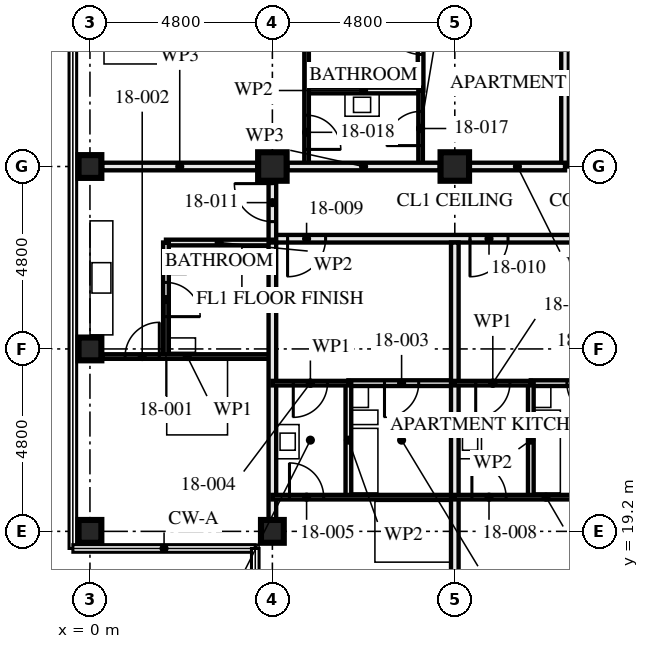
"""IFC4 building model, lengths in metres.
Left out: names, types, materials, properties, quantities, classifications, styles, units other than length and angle.
Written with IfcOpenShell. Run it as: python <this file> out.ifc"""

import sys

from ifc_helpers import new_model, si_unit, direction, frame, frame_2d, origin, origin_2d, place, context, subcontext, project, spatial, rectangle, hollow_rectangle, extrude, element, fill, save


model = new_model("IFC4")
c1 = context("Model", 3, precision=1e-05, world=origin(), true_north=direction((0.0, 1.0)))
c2 = subcontext(c1, "Body", "Model", "MODEL_VIEW")
j1 = project(units=[si_unit("LENGTHUNIT", "METRE"), si_unit("PLANEANGLEUNIT", "RADIAN")], contexts=[c1])
p1 = place(None, origin())
s1 = spatial("IfcSite", under=j1, at=p1, CompositionType="ELEMENT")
p2 = place(p1, origin())
s2 = spatial("IfcBuilding", under=s1, at=p2, CompositionType="ELEMENT")
p3 = place(p2, frame((0.0, 0.0, 69.0)))
s3 = spatial("IfcBuildingStorey", under=s2, at=p3, CompositionType="ELEMENT", Elevation=69.0)
for number, where, z_axis, x_axis in (
    (1, (0.0, 19.2, 0.0), (0.0, 0.0, 1.0), (0.0, 1.0, 0.0)),
    (2, (0.0, 24.0, 0.0), (0.0, 0.0, 1.0), (1.0, 0.0, 0.0)),
    (3, (0.0, 28.8, 0.0), (0.0, 0.0, 1.0), (0.0, 1.0, 0.0)),
    (4, (4.8, 19.2, 0.0), (0.0, 0.0, 1.0), (0.0, 1.0, 0.0)),
):
    element("IfcColumn", number, at=place(p3, frame(where, z_axis=z_axis, x_axis=x_axis)), inside=s3, PredefinedType="COLUMN", context=c2, shape_type="SweptSolid", body=[
        extrude(hollow_rectangle(XDim=0.6, YDim=0.6, WallThickness=0.08, at=origin_2d()), origin(), (0.0, 0.0, 1.0), 3.5),
    ])
for number, where, z_axis, x_axis in (
    (5, (4.8, 28.8, 0.0), (0.0, 0.0, 1.0), (0.0, 1.0, 0.0)),
    (6, (9.6, 28.8, 0.0), (0.0, 0.0, 1.0), (0.0, 1.0, 0.0)),
):
    element("IfcColumn", number, at=place(p3, frame(where, z_axis=z_axis, x_axis=x_axis)), inside=s3, PredefinedType="COLUMN", context=c2, shape_type="SweptSolid", body=[
        extrude(hollow_rectangle(XDim=0.75, YDim=0.75, WallThickness=0.08, at=origin_2d()), origin(), (0.0, 0.0, 1.0), 3.5),
    ])
p4 = place(p3, frame((2.0, 23.8, 0.0), z_axis=(0.0, 0.0, 1.0), x_axis=(0.0, 1.0, 0.0)))
e7 = element("IfcWall", 7, at=p4, inside=s3, PredefinedType="PARTITIONING", context=c2, shape_type="SweptSolid", body=[
    extrude(rectangle(XDim=3.0, YDim=0.15, at=frame_2d((1.5, 0.0))), origin(), (0.0, 0.0, 1.0), 2.55),
])
p5 = place(p4, frame((1.05, 0.0, 0.0)))
e8 = element("IfcOpeningElement", 8, at=p5, cuts=e7, PredefinedType="OPENING", context=c2, shape_type="SweptSolid", body=[
    extrude(rectangle(XDim=0.9, YDim=2.1, at=frame_2d((0.45, 1.05))), frame((0.0, 0.085, 0.0), z_axis=(0.0, -1.0, 0.0), x_axis=(1.0, 0.0, 0.0)), (0.0, 0.0, 1.0), 0.171),
])
p6 = place(p3, frame((2.0, 26.8, 0.0), z_axis=(0.0, 0.0, 1.0), x_axis=(1.0, 0.0, 0.0)))
e9 = element("IfcWall", 9, at=p6, inside=s3, PredefinedType="PARTITIONING", context=c2, shape_type="SweptSolid", body=[
    extrude(rectangle(XDim=2.8, YDim=0.15, at=frame_2d((1.4, 0.0))), origin(), (0.0, 0.0, 1.0), 3.33),
])
p7 = place(p3, frame((0.32, 23.8, 0.0), z_axis=(0.0, 0.0, 1.0), x_axis=(1.0, 0.0, 0.0)))
e10 = element("IfcWall", 10, at=p7, inside=s3, PredefinedType="PARTITIONING", context=c2, shape_type="SweptSolid", body=[
    extrude(rectangle(XDim=4.48, YDim=0.12, at=frame_2d((2.24, 0.0))), origin(), (0.0, 0.0, 1.0), 3.33),
])
p8 = place(p7, frame((0.605, 0.0, 0.0)))
e11 = element("IfcOpeningElement", 11, at=p8, cuts=e10, PredefinedType="OPENING", context=c2, shape_type="SweptSolid", body=[
    extrude(rectangle(XDim=0.9, YDim=2.1, at=frame_2d((0.45, 1.05))), frame((0.0, 0.071, 0.0), z_axis=(0.0, -1.0, 0.0), x_axis=(1.0, 0.0, 0.0)), (0.0, 0.0, 1.0), 0.141),
])
p9 = place(p3, frame((4.8, 19.52, 0.0), z_axis=(0.0, 0.0, 1.0), x_axis=(0.0, 1.0, 0.0)))
e12 = element("IfcWall", 12, at=p9, inside=s3, PredefinedType="PARTITIONING", context=c2, shape_type="SweptSolid", body=[
    extrude(rectangle(XDim=7.28, YDim=0.2, at=frame_2d((3.64, 0.0))), origin(), (0.0, 0.0, 1.0), 2.55),
])
p10 = place(p3, frame((6.8, 20.1, 0.0), z_axis=(0.0, 0.0, 1.0), x_axis=(0.0, 1.0, 0.0)))
e13 = element("IfcWall", 13, at=p10, inside=s3, PredefinedType="PARTITIONING", context=c2, shape_type="SweptSolid", body=[
    extrude(rectangle(XDim=3.0, YDim=0.15, at=frame_2d((1.5, 0.0))), origin(), (0.0, 0.0, 1.0), 3.33),
])
p11 = place(p3, frame((6.8, 23.1, 0.0), z_axis=(0.0, 0.0, 1.0), x_axis=(1.0, 0.0, 0.0)))
e14 = element("IfcWall", 14, at=p11, inside=s3, PredefinedType="PARTITIONING", context=c2, shape_type="SweptSolid", body=[
    extrude(rectangle(XDim=2.8, YDim=0.15, at=frame_2d((1.4, 0.0))), origin(), (0.0, 0.0, 1.0), 3.33),
])
p12 = place(p11, frame((0.95, 0.0, 0.0)))
e15 = element("IfcOpeningElement", 15, at=p12, cuts=e14, PredefinedType="OPENING", context=c2, shape_type="SweptSolid", body=[
    extrude(rectangle(XDim=0.9, YDim=2.1, at=frame_2d((0.45, 1.05))), frame((0.0, 0.085, 0.0), z_axis=(0.0, -1.0, 0.0), x_axis=(1.0, 0.0, 0.0)), (0.0, 0.0, 1.0), 0.171),
])
p13 = place(p3, frame((4.8, 23.1, 0.0), z_axis=(0.0, 0.0, 1.0), x_axis=(1.0, 0.0, 0.0)))
e16 = element("IfcWall", 16, at=p13, inside=s3, PredefinedType="PARTITIONING", context=c2, shape_type="SweptSolid", body=[
    extrude(rectangle(XDim=2.0, YDim=0.12, at=frame_2d((1.0, 0.0))), origin(), (0.0, 0.0, 1.0), 3.33),
])
p14 = place(p13, frame((0.55, 0.0, 0.0)))
e17 = element("IfcOpeningElement", 17, at=p14, cuts=e16, PredefinedType="OPENING", context=c2, shape_type="SweptSolid", body=[
    extrude(rectangle(XDim=0.9, YDim=2.1, at=frame_2d((0.45, 1.05))), frame((0.0, 0.071, 0.0), z_axis=(0.0, -1.0, 0.0), x_axis=(1.0, 0.0, 0.0)), (0.0, 0.0, 1.0), 0.141),
])
p15 = place(p3, frame((4.8, 20.1, 0.0), z_axis=(0.0, 0.0, 1.0), x_axis=(1.0, 0.0, 0.0)))
e18 = element("IfcWall", 18, at=p15, inside=s3, PredefinedType="PARTITIONING", context=c2, shape_type="SweptSolid", body=[
    extrude(rectangle(XDim=4.8, YDim=0.12, at=frame_2d((2.4, 0.0))), origin(), (0.0, 0.0, 1.0), 3.33),
])
p16 = place(p15, frame((0.45, 0.0, 0.0)))
e19 = element("IfcOpeningElement", 19, at=p16, cuts=e18, PredefinedType="OPENING", context=c2, shape_type="SweptSolid", body=[
    extrude(rectangle(XDim=0.9, YDim=2.1, at=frame_2d((0.45, 1.05))), frame((0.0, 0.071, 0.0), z_axis=(0.0, -1.0, 0.0), x_axis=(1.0, 0.0, 0.0)), (0.0, 0.0, 1.0), 0.141),
])
p17 = place(p3, frame((9.6, 14.72, 0.0), z_axis=(0.0, 0.0, 1.0), x_axis=(0.0, 1.0, 0.0)))
e20 = element("IfcWall", 20, at=p17, inside=s3, PredefinedType="PARTITIONING", context=c2, shape_type="SweptSolid", body=[
    extrude(rectangle(XDim=12.08, YDim=0.2, at=frame_2d((6.04, 0.0))), origin(), (0.0, 0.0, 1.0), 2.55),
])
p18 = place(p3, frame((11.6, 20.1, 0.0), z_axis=(0.0, 0.0, 1.0), x_axis=(0.0, 1.0, 0.0)))
e21 = element("IfcWall", 21, at=p18, inside=s3, PredefinedType="PARTITIONING", context=c2, shape_type="SweptSolid", body=[
    extrude(rectangle(XDim=3.0, YDim=0.15, at=frame_2d((1.5, 0.0))), origin(), (0.0, 0.0, 1.0), 3.33),
])
p19 = place(p3, frame((11.6, 23.1, 0.0), z_axis=(0.0, 0.0, 1.0), x_axis=(1.0, 0.0, 0.0)))
e22 = element("IfcWall", 22, at=p19, inside=s3, PredefinedType="PARTITIONING", context=c2, shape_type="SweptSolid", body=[
    extrude(rectangle(XDim=2.8, YDim=0.15, at=frame_2d((1.4, 0.0))), origin(), (0.0, 0.0, 1.0), 3.33),
])
p20 = place(p19, frame((0.95, 0.0, 0.0)))
e23 = element("IfcOpeningElement", 23, at=p20, cuts=e22, PredefinedType="OPENING", context=c2, shape_type="SweptSolid", body=[
    extrude(rectangle(XDim=0.9, YDim=2.1, at=frame_2d((0.45, 1.05))), frame((0.0, 0.085, 0.0), z_axis=(0.0, -1.0, 0.0), x_axis=(1.0, 0.0, 0.0)), (0.0, 0.0, 1.0), 0.171),
])
p21 = place(p3, frame((9.6, 23.1, 0.0), z_axis=(0.0, 0.0, 1.0), x_axis=(1.0, 0.0, 0.0)))
e24 = element("IfcWall", 24, at=p21, inside=s3, PredefinedType="PARTITIONING", context=c2, shape_type="SweptSolid", body=[
    extrude(rectangle(XDim=2.0, YDim=0.12, at=frame_2d((1.0, 0.0))), origin(), (0.0, 0.0, 1.0), 3.33),
])
p22 = place(p21, frame((0.55, 0.0, 0.0)))
e25 = element("IfcOpeningElement", 25, at=p22, cuts=e24, PredefinedType="OPENING", context=c2, shape_type="SweptSolid", body=[
    extrude(rectangle(XDim=0.9, YDim=2.1, at=frame_2d((0.45, 1.05))), frame((0.0, 0.071, 0.0), z_axis=(0.0, -1.0, 0.0), x_axis=(1.0, 0.0, 0.0)), (0.0, 0.0, 1.0), 0.141),
])
p23 = place(p3, frame((9.6, 20.1, 0.0), z_axis=(0.0, 0.0, 1.0), x_axis=(1.0, 0.0, 0.0)))
e26 = element("IfcWall", 26, at=p23, inside=s3, PredefinedType="PARTITIONING", context=c2, shape_type="SweptSolid", body=[
    extrude(rectangle(XDim=4.8, YDim=0.12, at=frame_2d((2.4, 0.0))), origin(), (0.0, 0.0, 1.0), 3.33),
])
p24 = place(p23, frame((0.45, 0.0, 0.0)))
e27 = element("IfcOpeningElement", 27, at=p24, cuts=e26, PredefinedType="OPENING", context=c2, shape_type="SweptSolid", body=[
    extrude(rectangle(XDim=0.9, YDim=2.1, at=frame_2d((0.45, 1.05))), frame((0.0, 0.071, 0.0), z_axis=(0.0, -1.0, 0.0), x_axis=(1.0, 0.0, 0.0)), (0.0, 0.0, 1.0), 0.141),
])
p25 = place(p3, frame((4.8, 26.9, 0.0), z_axis=(0.0, 0.0, 1.0), x_axis=(1.0, 0.0, 0.0)))
e28 = element("IfcWall", 28, at=p25, inside=s3, PredefinedType="PARTITIONING", context=c2, shape_type="SweptSolid", body=[
    extrude(rectangle(XDim=9.6, YDim=0.2, at=frame_2d((4.8, 0.0))), origin(), (0.0, 0.0, 1.0), 3.33),
])
p26 = place(p25, frame((0.4, 0.0, 0.0)))
e29 = element("IfcOpeningElement", 29, at=p26, cuts=e28, PredefinedType="OPENING", context=c2, shape_type="SweptSolid", body=[
    extrude(rectangle(XDim=1.0, YDim=2.1, at=frame_2d((0.5, 1.05))), frame((0.0, 0.111, 0.0), z_axis=(0.0, -1.0, 0.0), x_axis=(1.0, 0.0, 0.0)), (0.0, 0.0, 1.0), 0.221),
])
p27 = place(p25, frame((5.2, 0.0, 0.0)))
e30 = element("IfcOpeningElement", 30, at=p27, cuts=e28, PredefinedType="OPENING", context=c2, shape_type="SweptSolid", body=[
    extrude(rectangle(XDim=1.0, YDim=2.1, at=frame_2d((0.5, 1.05))), frame((0.0, 0.111, 0.0), z_axis=(0.0, -1.0, 0.0), x_axis=(1.0, 0.0, 0.0)), (0.0, 0.0, 1.0), 0.221),
])
p28 = place(p3, frame((4.8, 26.8, 0.0), z_axis=(0.0, 0.0, 1.0), x_axis=(0.0, 1.0, 0.0)))
e31 = element("IfcWall", 31, at=p28, inside=s3, PredefinedType="PARTITIONING", context=c2, shape_type="SweptSolid", body=[
    extrude(rectangle(XDim=1.605, YDim=0.2, at=frame_2d((0.802, 0.0))), origin(), (0.0, 0.0, 1.0), 3.33),
])
p29 = place(p28, frame((0.55, 0.0, 0.0)))
e32 = element("IfcOpeningElement", 32, at=p29, cuts=e31, PredefinedType="OPENING", context=c2, shape_type="SweptSolid", body=[
    extrude(rectangle(XDim=1.0, YDim=2.1, at=frame_2d((0.5, 1.05))), frame((0.0, 0.111, 0.0), z_axis=(0.0, -1.0, 0.0), x_axis=(1.0, 0.0, 0.0)), (0.0, 0.0, 1.0), 0.221),
])
p30 = place(p3, frame((5.7, 30.8, 0.0), z_axis=(0.0, 0.0, 1.0), x_axis=(1.0, 0.0, 0.0)))
e33 = element("IfcWall", 33, at=p30, inside=s3, PredefinedType="PARTITIONING", context=c2, shape_type="SweptSolid", body=[
    extrude(rectangle(XDim=3.0, YDim=0.15, at=frame_2d((1.5, 0.0))), origin(), (0.0, 0.0, 1.0), 3.33),
])
p31 = place(p3, frame((8.7, 33.6, 0.0), z_axis=(0.0, 0.0, 1.0), x_axis=(0.0, -1.0, 0.0)))
e34 = element("IfcWall", 34, at=p31, inside=s3, PredefinedType="PARTITIONING", context=c2, shape_type="SweptSolid", body=[
    extrude(rectangle(XDim=2.8, YDim=0.15, at=frame_2d((1.4, 0.0))), origin(), (0.0, 0.0, 1.0), 3.33),
])
p32 = place(p31, frame((0.95, 0.0, 0.0)))
e35 = element("IfcOpeningElement", 35, at=p32, cuts=e34, PredefinedType="OPENING", context=c2, shape_type="SweptSolid", body=[
    extrude(rectangle(XDim=0.9, YDim=2.1, at=frame_2d((0.45, 1.05))), frame((0.0, 0.085, 0.0), z_axis=(0.0, -1.0, 0.0), x_axis=(1.0, 0.0, 0.0)), (0.0, 0.0, 1.0), 0.171),
])
p33 = place(p3, frame((8.7, 30.8, 0.0), z_axis=(0.0, 0.0, 1.0), x_axis=(0.0, -1.0, 0.0)))
e36 = element("IfcWall", 36, at=p33, inside=s3, PredefinedType="PARTITIONING", context=c2, shape_type="SweptSolid", body=[
    extrude(rectangle(XDim=2.0, YDim=0.12, at=frame_2d((1.0, 0.0))), origin(), (0.0, 0.0, 1.0), 3.33),
])
p34 = place(p33, frame((0.55, 0.0, 0.0)))
e37 = element("IfcOpeningElement", 37, at=p34, cuts=e36, PredefinedType="OPENING", context=c2, shape_type="SweptSolid", body=[
    extrude(rectangle(XDim=0.9, YDim=2.1, at=frame_2d((0.45, 1.05))), frame((0.0, 0.071, 0.0), z_axis=(0.0, -1.0, 0.0), x_axis=(1.0, 0.0, 0.0)), (0.0, 0.0, 1.0), 0.141),
])
p35 = place(p3, frame((5.7, 33.6, 0.0), z_axis=(0.0, 0.0, 1.0), x_axis=(0.0, -1.0, 0.0)))
e38 = element("IfcWall", 38, at=p35, inside=s3, PredefinedType="PARTITIONING", context=c2, shape_type="SweptSolid", body=[
    extrude(rectangle(XDim=4.8, YDim=0.12, at=frame_2d((2.4, 0.0))), origin(), (0.0, 0.0, 1.0), 3.33),
])
p36 = place(p35, frame((3.45, 0.0, 0.0)))
e39 = element("IfcOpeningElement", 39, at=p36, cuts=e38, PredefinedType="OPENING", context=c2, shape_type="SweptSolid", body=[
    extrude(rectangle(XDim=0.9, YDim=2.1, at=frame_2d((0.45, 1.05))), frame((0.0, 0.071, 0.0), z_axis=(0.0, -1.0, 0.0), x_axis=(1.0, 0.0, 0.0)), (0.0, 0.0, 1.0), 0.141),
])
p37 = place(p3, frame((12.5, 43.2, 0.0), z_axis=(0.0, 0.0, 1.0), x_axis=(0.0, -1.0, 0.0)))
e40 = element("IfcWall", 40, at=p37, inside=s3, PredefinedType="PARTITIONING", context=c2, shape_type="SweptSolid", body=[
    extrude(rectangle(XDim=14.4, YDim=0.2, at=frame_2d((7.2, 0.0))), origin(), (0.0, 0.0, 1.0), 2.55),
])
p38 = place(p37, frame((1.4, 0.0, 0.0)))
e41 = element("IfcOpeningElement", 41, at=p38, cuts=e40, PredefinedType="OPENING", context=c2, shape_type="SweptSolid", body=[
    extrude(rectangle(XDim=1.0, YDim=2.1, at=frame_2d((0.5, 1.05))), frame((0.0, 0.111, 0.0), z_axis=(0.0, -1.0, 0.0), x_axis=(1.0, 0.0, 0.0)), (0.0, 0.0, 1.0), 0.221),
])
p39 = place(p37, frame((5.2, 0.0, 0.0)))
e42 = element("IfcOpeningElement", 42, at=p39, cuts=e40, PredefinedType="OPENING", context=c2, shape_type="SweptSolid", body=[
    extrude(rectangle(XDim=1.0, YDim=2.1, at=frame_2d((0.5, 1.05))), frame((0.0, 0.111, 0.0), z_axis=(0.0, -1.0, 0.0), x_axis=(1.0, 0.0, 0.0)), (0.0, 0.0, 1.0), 0.221),
])
p40 = place(p37, frame((10.0, 0.0, 0.0)))
e43 = element("IfcOpeningElement", 43, at=p40, cuts=e40, PredefinedType="OPENING", context=c2, shape_type="SweptSolid", body=[
    extrude(rectangle(XDim=1.0, YDim=2.1, at=frame_2d((0.5, 1.05))), frame((0.0, 0.111, 0.0), z_axis=(0.0, -1.0, 0.0), x_axis=(1.0, 0.0, 0.0)), (0.0, 0.0, 1.0), 0.221),
])
p41 = place(p3, frame((12.5, 28.8, 0.0), z_axis=(0.0, 0.0, 1.0), x_axis=(-1.0, 0.0, 0.0)))
e44 = element("IfcWall", 44, at=p41, inside=s3, PredefinedType="PARTITIONING", context=c2, shape_type="SweptSolid", body=[
    extrude(rectangle(XDim=2.505, YDim=0.2, at=frame_2d((1.252, 0.0))), origin(), (0.0, 0.0, 1.0), 2.32),
])
p42 = place(p3, frame((9.205, 28.8, 0.0), z_axis=(0.0, 0.0, 1.0), x_axis=(-1.0, 0.0, 0.0)))
e45 = element("IfcWall", 45, at=p42, inside=s3, PredefinedType="PARTITIONING", context=c2, shape_type="SweptSolid", body=[
    extrude(rectangle(XDim=4.01, YDim=0.2, at=frame_2d((2.005, 0.0))), origin(), (0.0, 0.0, 1.0), 2.32),
])
p43 = place(p3, frame((4.405, 28.8, 0.0), z_axis=(0.0, 0.0, 1.0), x_axis=(-1.0, 0.0, 0.0)))
e46 = element("IfcWall", 46, at=p43, inside=s3, PredefinedType="PARTITIONING", context=c2, shape_type="SweptSolid", body=[
    extrude(rectangle(XDim=4.085, YDim=0.2, at=frame_2d((2.042, 0.0))), origin(), (0.0, 0.0, 1.0), 2.32),
])
p44 = place(p5, frame((0.9, 0.0, 0.0), z_axis=(0.0, 0.0, 1.0), x_axis=(-1.0, 0.0, 0.0)))
e47 = element("IfcDoor", 47, at=p44, inside=s3, OperationType="SINGLE_SWING_LEFT", PredefinedType="DOOR", context=c2, shape_type="SweptSolid", body=[
    extrude(rectangle(XDim=0.9, YDim=2.1, at=frame_2d((0.45, 1.05))), frame((0.0, 0.022, 0.0), z_axis=(0.0, -1.0, 0.0), x_axis=(1.0, 0.0, 0.0)), (0.0, 0.0, 1.0), 0.044),
])
fill(e8, e47)
p45 = place(p8, origin())
e48 = element("IfcDoor", 48, at=p45, inside=s3, OperationType="SINGLE_SWING_LEFT", PredefinedType="DOOR", context=c2, shape_type="SweptSolid", body=[
    extrude(rectangle(XDim=0.9, YDim=2.1, at=frame_2d((0.45, 1.05))), frame((0.0, 0.022, 0.0), z_axis=(0.0, -1.0, 0.0), x_axis=(1.0, 0.0, 0.0)), (0.0, 0.0, 1.0), 0.044),
])
fill(e11, e48)
p46 = place(p12, frame((0.9, 0.0, 0.0), z_axis=(0.0, 0.0, 1.0), x_axis=(-1.0, 0.0, 0.0)))
e49 = element("IfcDoor", 49, at=p46, inside=s3, OperationType="SINGLE_SWING_LEFT", PredefinedType="DOOR", context=c2, shape_type="SweptSolid", body=[
    extrude(rectangle(XDim=0.9, YDim=2.1, at=frame_2d((0.45, 1.05))), frame((0.0, 0.022, 0.0), z_axis=(0.0, -1.0, 0.0), x_axis=(1.0, 0.0, 0.0)), (0.0, 0.0, 1.0), 0.044),
])
fill(e15, e49)
p47 = place(p14, frame((0.9, 0.0, 0.0), z_axis=(0.0, 0.0, 1.0), x_axis=(-1.0, 0.0, 0.0)))
e50 = element("IfcDoor", 50, at=p47, inside=s3, OperationType="SINGLE_SWING_LEFT", PredefinedType="DOOR", context=c2, shape_type="SweptSolid", body=[
    extrude(rectangle(XDim=0.9, YDim=2.1, at=frame_2d((0.45, 1.05))), frame((0.0, 0.022, 0.0), z_axis=(0.0, -1.0, 0.0), x_axis=(1.0, 0.0, 0.0)), (0.0, 0.0, 1.0), 0.044),
])
fill(e17, e50)
p48 = place(p16, origin())
e51 = element("IfcDoor", 51, at=p48, inside=s3, OperationType="SINGLE_SWING_RIGHT", PredefinedType="DOOR", context=c2, shape_type="SweptSolid", body=[
    extrude(rectangle(XDim=0.9, YDim=2.1, at=frame_2d((0.45, 1.05))), frame((0.0, 0.022, 0.0), z_axis=(0.0, -1.0, 0.0), x_axis=(1.0, 0.0, 0.0)), (0.0, 0.0, 1.0), 0.044),
])
fill(e19, e51)
p49 = place(p20, frame((0.9, 0.0, 0.0), z_axis=(0.0, 0.0, 1.0), x_axis=(-1.0, 0.0, 0.0)))
e52 = element("IfcDoor", 52, at=p49, inside=s3, OperationType="SINGLE_SWING_RIGHT", PredefinedType="DOOR", context=c2, shape_type="SweptSolid", body=[
    extrude(rectangle(XDim=0.9, YDim=2.1, at=frame_2d((0.45, 1.05))), frame((0.0, 0.022, 0.0), z_axis=(0.0, -1.0, 0.0), x_axis=(1.0, 0.0, 0.0)), (0.0, 0.0, 1.0), 0.044),
])
fill(e23, e52)
p50 = place(p22, frame((0.9, 0.0, 0.0), z_axis=(0.0, 0.0, 1.0), x_axis=(-1.0, 0.0, 0.0)))
e53 = element("IfcDoor", 53, at=p50, inside=s3, OperationType="SINGLE_SWING_LEFT", PredefinedType="DOOR", context=c2, shape_type="SweptSolid", body=[
    extrude(rectangle(XDim=0.9, YDim=2.1, at=frame_2d((0.45, 1.05))), frame((0.0, 0.022, 0.0), z_axis=(0.0, -1.0, 0.0), x_axis=(1.0, 0.0, 0.0)), (0.0, 0.0, 1.0), 0.044),
])
fill(e25, e53)
p51 = place(p24, origin())
e54 = element("IfcDoor", 54, at=p51, inside=s3, OperationType="SINGLE_SWING_RIGHT", PredefinedType="DOOR", context=c2, shape_type="SweptSolid", body=[
    extrude(rectangle(XDim=0.9, YDim=2.1, at=frame_2d((0.45, 1.05))), frame((0.0, 0.022, 0.0), z_axis=(0.0, -1.0, 0.0), x_axis=(1.0, 0.0, 0.0)), (0.0, 0.0, 1.0), 0.044),
])
fill(e27, e54)
p52 = place(p26, frame((1.0, 0.0, 0.0), z_axis=(0.0, 0.0, 1.0), x_axis=(-1.0, 0.0, 0.0)))
e55 = element("IfcDoor", 55, at=p52, inside=s3, OperationType="SINGLE_SWING_LEFT", PredefinedType="DOOR", context=c2, shape_type="SweptSolid", body=[
    extrude(rectangle(XDim=1.0, YDim=2.1, at=frame_2d((0.5, 1.05))), frame((0.0, 0.027, 0.0), z_axis=(0.0, -1.0, 0.0), x_axis=(1.0, 0.0, 0.0)), (0.0, 0.0, 1.0), 0.054),
])
fill(e29, e55)
p53 = place(p27, frame((1.0, 0.0, 0.0), z_axis=(0.0, 0.0, 1.0), x_axis=(-1.0, 0.0, 0.0)))
e56 = element("IfcDoor", 56, at=p53, inside=s3, OperationType="SINGLE_SWING_LEFT", PredefinedType="DOOR", context=c2, shape_type="SweptSolid", body=[
    extrude(rectangle(XDim=1.0, YDim=2.1, at=frame_2d((0.5, 1.05))), frame((0.0, 0.027, 0.0), z_axis=(0.0, -1.0, 0.0), x_axis=(1.0, 0.0, 0.0)), (0.0, 0.0, 1.0), 0.054),
])
fill(e30, e56)
p54 = place(p29, origin())
e57 = element("IfcDoor", 57, at=p54, inside=s3, OperationType="SINGLE_SWING_LEFT", PredefinedType="DOOR", context=c2, shape_type="SweptSolid", body=[
    extrude(rectangle(XDim=1.0, YDim=2.1, at=frame_2d((0.5, 1.05))), frame((0.0, 0.027, 0.0), z_axis=(0.0, -1.0, 0.0), x_axis=(1.0, 0.0, 0.0)), (0.0, 0.0, 1.0), 0.054),
])
fill(e32, e57)
p55 = place(p32, frame((0.9, 0.0, 0.0), z_axis=(0.0, 0.0, 1.0), x_axis=(-1.0, 0.0, 0.0)))
e58 = element("IfcDoor", 58, at=p55, inside=s3, OperationType="SINGLE_SWING_LEFT", PredefinedType="DOOR", context=c2, shape_type="SweptSolid", body=[
    extrude(rectangle(XDim=0.9, YDim=2.1, at=frame_2d((0.45, 1.05))), frame((0.0, 0.022, 0.0), z_axis=(0.0, -1.0, 0.0), x_axis=(1.0, 0.0, 0.0)), (0.0, 0.0, 1.0), 0.044),
])
fill(e35, e58)
p56 = place(p34, frame((0.9, 0.0, 0.0), z_axis=(0.0, 0.0, 1.0), x_axis=(-1.0, 0.0, 0.0)))
e59 = element("IfcDoor", 59, at=p56, inside=s3, OperationType="SINGLE_SWING_RIGHT", PredefinedType="DOOR", context=c2, shape_type="SweptSolid", body=[
    extrude(rectangle(XDim=0.9, YDim=2.1, at=frame_2d((0.45, 1.05))), frame((0.0, 0.022, 0.0), z_axis=(0.0, -1.0, 0.0), x_axis=(1.0, 0.0, 0.0)), (0.0, 0.0, 1.0), 0.044),
])
fill(e37, e59)
p57 = place(p36, origin())
e60 = element("IfcDoor", 60, at=p57, inside=s3, OperationType="SINGLE_SWING_LEFT", PredefinedType="DOOR", context=c2, shape_type="SweptSolid", body=[
    extrude(rectangle(XDim=0.9, YDim=2.1, at=frame_2d((0.45, 1.05))), frame((0.0, 0.022, 0.0), z_axis=(0.0, -1.0, 0.0), x_axis=(1.0, 0.0, 0.0)), (0.0, 0.0, 1.0), 0.044),
])
fill(e39, e60)
save(model, sys.argv[1])
